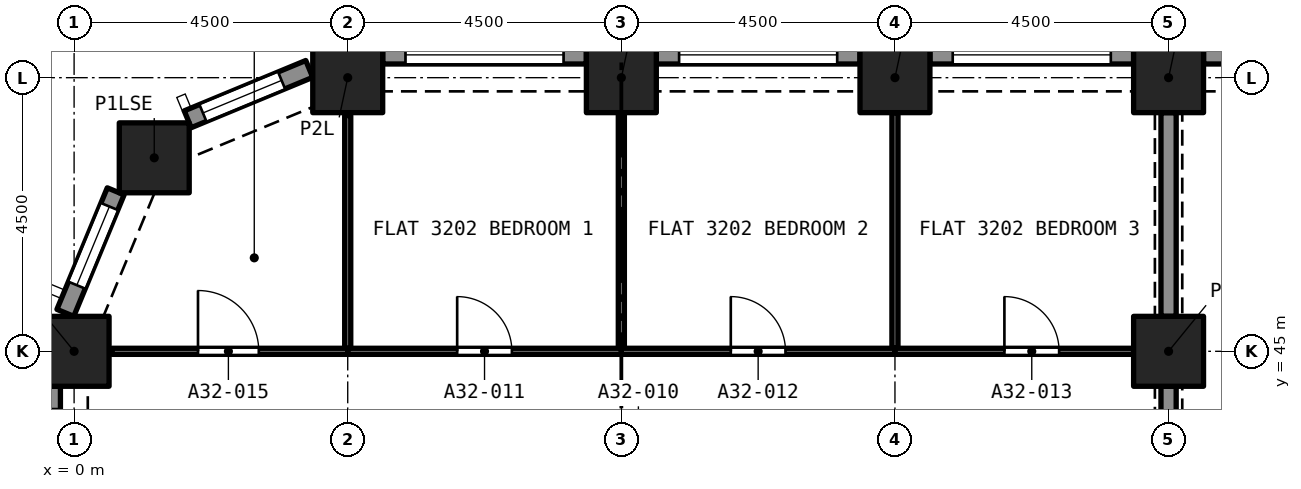
"""IFC4 building model, lengths in metres.
Left out: names, types, materials, properties, quantities, classifications, styles, units other than length and angle.
Written with IfcOpenShell. Run it as: python <this file> out.ifc"""

import sys

from ifc_helpers import new_model, si_unit, direction, frame, frame_2d, origin, origin_2d, place, context, subcontext, project, spatial, rectangle, extrude, element, fill, save


model = new_model("IFC4")
c1 = context("Model", 3, precision=1e-05, world=origin(), true_north=direction((0.0, 1.0)))
c2 = subcontext(c1, "Body", "Model", "MODEL_VIEW")
j1 = project(units=[si_unit("LENGTHUNIT", "METRE"), si_unit("PLANEANGLEUNIT", "RADIAN")], contexts=[c1])
p1 = place(None, origin())
s1 = spatial("IfcSite", under=j1, at=p1, CompositionType="ELEMENT")
p2 = place(p1, origin())
s2 = spatial("IfcBuilding", under=s1, at=p2, CompositionType="ELEMENT")
p3 = place(p2, frame((0.0, 0.0, 115.2)))
s3 = spatial("IfcBuildingStorey", under=s2, at=p3, CompositionType="ELEMENT", Elevation=115.2)
for number, where, z_axis, x_axis in (
    (1, (0.0, 45.0, 0.0), (0.0, 0.0, 1.0), (1.0, 0.0, 0.0)),
    (2, (18.0, 45.0, 0.0), (0.0, 0.0, 1.0), (1.0, 0.0, 0.0)),
    (3, (1.318, 48.182, 0.0), (0.0, 0.0, 1.0), (1.0, 0.0, 0.0)),
    (4, (4.5, 49.5, 0.0), (0.0, 0.0, 1.0), (1.0, 0.0, 0.0)),
    (5, (9.0, 49.5, 0.0), (0.0, 0.0, 1.0), (1.0, 0.0, 0.0)),
    (6, (13.5, 49.5, 0.0), (0.0, 0.0, 1.0), (1.0, 0.0, 0.0)),
    (7, (18.0, 49.5, 0.0), (0.0, 0.0, 1.0), (1.0, 0.0, 0.0)),
):
    element("IfcColumn", number, at=place(p3, frame(where, z_axis=z_axis, x_axis=x_axis)), inside=s3, PredefinedType="COLUMN", context=c2, shape_type="SweptSolid", body=[
        extrude(rectangle(XDim=1.15, YDim=1.15, at=origin_2d()), origin(), (0.0, 0.0, 1.0), 3.2),
    ])
p4 = place(p3, frame((18.575, 49.875, 0.0), z_axis=(0.0, 0.0, 1.0), x_axis=(1.0, 0.0, 0.0)))
e8 = element("IfcWall", 8, at=p4, inside=s3, PredefinedType="SOLIDWALL", context=c2, shape_type="SweptSolid", body=[
    extrude(rectangle(XDim=3.35, YDim=0.3, at=frame_2d((1.675, 0.0))), origin(), (0.0, 0.0, 1.0), 3.2),
])
p5 = place(p4, frame((0.375, 0.0, 0.45)))
e9 = element("IfcOpeningElement", 9, at=p5, cuts=e8, PredefinedType="OPENING", context=c2, shape_type="SweptSolid", body=[
    extrude(rectangle(XDim=2.6, YDim=1.95, at=frame_2d((1.3, 0.975))), frame((0.0, 0.16, 0.0), z_axis=(0.0, -1.0, 0.0), x_axis=(1.0, 0.0, 0.0)), (0.0, 0.0, 1.0), 0.32),
])
p6 = place(p3, frame((14.075, 49.875, 0.0), z_axis=(0.0, 0.0, 1.0), x_axis=(1.0, 0.0, 0.0)))
e10 = element("IfcWall", 10, at=p6, inside=s3, PredefinedType="SOLIDWALL", context=c2, shape_type="SweptSolid", body=[
    extrude(rectangle(XDim=3.35, YDim=0.3, at=frame_2d((1.675, 0.0))), origin(), (0.0, 0.0, 1.0), 3.2),
])
p7 = place(p6, frame((0.375, 0.0, 0.45)))
e11 = element("IfcOpeningElement", 11, at=p7, cuts=e10, PredefinedType="OPENING", context=c2, shape_type="SweptSolid", body=[
    extrude(rectangle(XDim=2.6, YDim=1.95, at=frame_2d((1.3, 0.975))), frame((0.0, 0.16, 0.0), z_axis=(0.0, -1.0, 0.0), x_axis=(1.0, 0.0, 0.0)), (0.0, 0.0, 1.0), 0.32),
])
p8 = place(p3, frame((9.575, 49.875, 0.0), z_axis=(0.0, 0.0, 1.0), x_axis=(1.0, 0.0, 0.0)))
e12 = element("IfcWall", 12, at=p8, inside=s3, PredefinedType="SOLIDWALL", context=c2, shape_type="SweptSolid", body=[
    extrude(rectangle(XDim=3.35, YDim=0.3, at=frame_2d((1.675, 0.0))), origin(), (0.0, 0.0, 1.0), 3.2),
])
p9 = place(p8, frame((0.375, 0.0, 0.45)))
e13 = element("IfcOpeningElement", 13, at=p9, cuts=e12, PredefinedType="OPENING", context=c2, shape_type="SweptSolid", body=[
    extrude(rectangle(XDim=2.6, YDim=1.95, at=frame_2d((1.3, 0.975))), frame((0.0, 0.16, 0.0), z_axis=(0.0, -1.0, 0.0), x_axis=(1.0, 0.0, 0.0)), (0.0, 0.0, 1.0), 0.32),
])
p10 = place(p3, frame((5.075, 49.875, 0.0), z_axis=(0.0, 0.0, 1.0), x_axis=(1.0, 0.0, 0.0)))
e14 = element("IfcWall", 14, at=p10, inside=s3, PredefinedType="SOLIDWALL", context=c2, shape_type="SweptSolid", body=[
    extrude(rectangle(XDim=3.35, YDim=0.3, at=frame_2d((1.675, 0.0))), origin(), (0.0, 0.0, 1.0), 3.2),
])
p11 = place(p10, frame((0.375, 0.0, 0.45)))
e15 = element("IfcOpeningElement", 15, at=p11, cuts=e14, PredefinedType="OPENING", context=c2, shape_type="SweptSolid", body=[
    extrude(rectangle(XDim=2.6, YDim=1.95, at=frame_2d((1.3, 0.975))), frame((0.0, 0.16, 0.0), z_axis=(0.0, -1.0, 0.0), x_axis=(1.0, 0.0, 0.0)), (0.0, 0.0, 1.0), 0.32),
])
p12 = place(p3, frame((1.869, 48.816, 0.0), z_axis=(0.0, 0.0, 1.0), x_axis=(0.923862802911, 0.382723818695, 0.0)))
e16 = element("IfcWall", 16, at=p12, inside=s3, PredefinedType="SOLIDWALL", context=c2, shape_type="SweptSolid", body=[
    extrude(rectangle(XDim=2.164, YDim=0.3, at=frame_2d((1.082, 0.0))), origin(), (0.0, 0.0, 1.0), 3.2),
])
p13 = place(p12, frame((0.271, 0.0, 0.45)))
e17 = element("IfcOpeningElement", 17, at=p13, cuts=e16, PredefinedType="OPENING", context=c2, shape_type="SweptSolid", body=[
    extrude(rectangle(XDim=1.4, YDim=1.95, at=frame_2d((0.7, 0.975))), frame((0.0, 0.16, 0.0), z_axis=(0.0, -1.0, 0.0), x_axis=(1.0, 0.0, 0.0)), (0.0, 0.0, 1.0), 0.32),
])
p14 = place(p3, frame((-0.144, 45.632, 0.0), z_axis=(0.0, 0.0, 1.0), x_axis=(0.382723818695, 0.923862802911, 0.0)))
e18 = element("IfcWall", 18, at=p14, inside=s3, PredefinedType="SOLIDWALL", context=c2, shape_type="SweptSolid", body=[
    extrude(rectangle(XDim=2.164, YDim=0.3, at=frame_2d((1.082, 0.0))), origin(), (0.0, 0.0, 1.0), 3.2),
])
p15 = place(p14, frame((0.493, 0.0, 0.45)))
e19 = element("IfcOpeningElement", 19, at=p15, cuts=e18, PredefinedType="OPENING", context=c2, shape_type="SweptSolid", body=[
    extrude(rectangle(XDim=1.4, YDim=1.95, at=frame_2d((0.7, 0.975))), frame((0.0, 0.16, 0.0), z_axis=(0.0, -1.0, 0.0), x_axis=(1.0, 0.0, 0.0)), (0.0, 0.0, 1.0), 0.32),
])
p16 = place(p3, frame((-0.375, 41.075, 0.0), z_axis=(0.0, 0.0, 1.0), x_axis=(0.0, 1.0, 0.0)))
e20 = element("IfcWall", 20, at=p16, inside=s3, PredefinedType="SOLIDWALL", context=c2, shape_type="SweptSolid", body=[
    extrude(rectangle(XDim=3.35, YDim=0.3, at=frame_2d((1.675, 0.0))), origin(), (0.0, 0.0, 1.0), 3.2),
])
p17 = place(p16, frame((0.375, 0.0, 0.45)))
e21 = element("IfcOpeningElement", 21, at=p17, cuts=e20, PredefinedType="OPENING", context=c2, shape_type="SweptSolid", body=[
    extrude(rectangle(XDim=2.6, YDim=1.95, at=frame_2d((1.3, 0.975))), frame((0.0, 0.16, 0.0), z_axis=(0.0, -1.0, 0.0), x_axis=(1.0, 0.0, 0.0)), (0.0, 0.0, 1.0), 0.32),
])
p18 = place(p3, frame((9.0, 45.05, 0.0), z_axis=(0.0, 0.0, 1.0), x_axis=(0.0, 1.0, 0.0)))
e22 = element("IfcWall", 22, at=p18, inside=s3, PredefinedType="PARTITIONING", context=c2, shape_type="SweptSolid", body=[
    extrude(rectangle(XDim=3.875, YDim=0.1, at=frame_2d((1.938, 0.0))), origin(), (0.0, 0.0, 1.0), 2.9),
])
p19 = place(p3, frame((4.5, 45.0, 0.0), z_axis=(0.0, 0.0, 1.0), x_axis=(1.0, 0.0, 0.0)))
e23 = element("IfcWall", 23, at=p19, inside=s3, PredefinedType="PARTITIONING", context=c2, shape_type="SweptSolid", body=[
    extrude(rectangle(XDim=4.5, YDim=0.1, at=frame_2d((2.25, 0.0))), origin(), (0.0, 0.0, 1.0), 2.9),
])
p20 = place(p19, frame((1.8, 0.0, 0.0)))
e24 = element("IfcOpeningElement", 24, at=p20, cuts=e23, PredefinedType="OPENING", context=c2, shape_type="SweptSolid", body=[
    extrude(rectangle(XDim=0.9, YDim=2.1, at=frame_2d((0.45, 1.05))), frame((0.0, 0.06, 0.0), z_axis=(0.0, -1.0, 0.0), x_axis=(1.0, 0.0, 0.0)), (0.0, 0.0, 1.0), 0.12),
])
p21 = place(p3, frame((4.5, 45.05, 0.0), z_axis=(0.0, 0.0, 1.0), x_axis=(0.0, 1.0, 0.0)))
e25 = element("IfcWall", 25, at=p21, inside=s3, PredefinedType="PARTITIONING", context=c2, shape_type="SweptSolid", body=[
    extrude(rectangle(XDim=3.828, YDim=0.1, at=frame_2d((1.914, 0.0))), origin(), (0.0, 0.0, 1.0), 2.9),
])
p22 = place(p3, frame((13.5, 45.05, 0.0), z_axis=(0.0, 0.0, 1.0), x_axis=(0.0, 1.0, 0.0)))
e26 = element("IfcWall", 26, at=p22, inside=s3, PredefinedType="PARTITIONING", context=c2, shape_type="SweptSolid", body=[
    extrude(rectangle(XDim=3.875, YDim=0.1, at=frame_2d((1.938, 0.0))), origin(), (0.0, 0.0, 1.0), 2.9),
])
p23 = place(p3, frame((9.0, 45.0, 0.0), z_axis=(0.0, 0.0, 1.0), x_axis=(1.0, 0.0, 0.0)))
e27 = element("IfcWall", 27, at=p23, inside=s3, PredefinedType="PARTITIONING", context=c2, shape_type="SweptSolid", body=[
    extrude(rectangle(XDim=4.5, YDim=0.1, at=frame_2d((2.25, 0.0))), origin(), (0.0, 0.0, 1.0), 2.9),
])
p24 = place(p23, frame((1.8, 0.0, 0.0)))
e28 = element("IfcOpeningElement", 28, at=p24, cuts=e27, PredefinedType="OPENING", context=c2, shape_type="SweptSolid", body=[
    extrude(rectangle(XDim=0.9, YDim=2.1, at=frame_2d((0.45, 1.05))), frame((0.0, 0.06, 0.0), z_axis=(0.0, -1.0, 0.0), x_axis=(1.0, 0.0, 0.0)), (0.0, 0.0, 1.0), 0.12),
])
p25 = place(p3, frame((13.5, 45.0, 0.0), z_axis=(0.0, 0.0, 1.0), x_axis=(1.0, 0.0, 0.0)))
e29 = element("IfcWall", 29, at=p25, inside=s3, PredefinedType="PARTITIONING", context=c2, shape_type="SweptSolid", body=[
    extrude(rectangle(XDim=3.925, YDim=0.1, at=frame_2d((1.962, 0.0))), origin(), (0.0, 0.0, 1.0), 2.9),
])
p26 = place(p25, frame((1.8, 0.0, 0.0)))
e30 = element("IfcOpeningElement", 30, at=p26, cuts=e29, PredefinedType="OPENING", context=c2, shape_type="SweptSolid", body=[
    extrude(rectangle(XDim=0.9, YDim=2.1, at=frame_2d((0.45, 1.05))), frame((0.0, 0.06, 0.0), z_axis=(0.0, -1.0, 0.0), x_axis=(1.0, 0.0, 0.0)), (0.0, 0.0, 1.0), 0.12),
])
p27 = place(p3, frame((18.0, 45.575, 0.0), z_axis=(0.0, 0.0, 1.0), x_axis=(0.0, 1.0, 0.0)))
e31 = element("IfcWall", 31, at=p27, inside=s3, PredefinedType="PARTITIONING", context=c2, shape_type="SweptSolid", body=[
    extrude(rectangle(XDim=3.35, YDim=0.25, at=frame_2d((1.675, 0.0))), origin(), (0.0, 0.0, 1.0), 2.38),
])
p28 = place(p3, frame((0.622, 45.0, 0.0), z_axis=(0.0, 0.0, 1.0), x_axis=(1.0, 0.0, 0.0)))
e32 = element("IfcWall", 32, at=p28, inside=s3, PredefinedType="PARTITIONING", context=c2, shape_type="SweptSolid", body=[
    extrude(rectangle(XDim=3.878, YDim=0.1, at=frame_2d((1.939, 0.0))), origin(), (0.0, 0.0, 1.0), 2.9),
])
p29 = place(p28, frame((1.415, 0.0, 0.0)))
e33 = element("IfcOpeningElement", 33, at=p29, cuts=e32, PredefinedType="OPENING", context=c2, shape_type="SweptSolid", body=[
    extrude(rectangle(XDim=1.0, YDim=2.1, at=frame_2d((0.5, 1.05))), frame((0.0, 0.06, 0.0), z_axis=(0.0, -1.0, 0.0), x_axis=(1.0, 0.0, 0.0)), (0.0, 0.0, 1.0), 0.12),
])
p30 = place(p3, frame((18.0, 41.075, 0.0), z_axis=(0.0, 0.0, 1.0), x_axis=(0.0, 1.0, 0.0)))
e34 = element("IfcWall", 34, at=p30, inside=s3, PredefinedType="PARTITIONING", context=c2, shape_type="SweptSolid", body=[
    extrude(rectangle(XDim=3.35, YDim=0.25, at=frame_2d((1.675, 0.0))), origin(), (0.0, 0.0, 1.0), 2.38),
])
p31 = place(p7, origin())
e35 = element("IfcWindow", 35, at=p31, inside=s3, PartitioningType="SINGLE_PANEL", PredefinedType="WINDOW", context=c2, shape_type="SweptSolid", body=[
    extrude(rectangle(XDim=2.6, YDim=1.95, at=frame_2d((1.3, 0.975))), frame((0.0, 0.03, 0.0), z_axis=(0.0, -1.0, 0.0), x_axis=(1.0, 0.0, 0.0)), (0.0, 0.0, 1.0), 0.06),
])
fill(e11, e35)
p32 = place(p9, origin())
e36 = element("IfcWindow", 36, at=p32, inside=s3, PartitioningType="SINGLE_PANEL", PredefinedType="WINDOW", context=c2, shape_type="SweptSolid", body=[
    extrude(rectangle(XDim=2.6, YDim=1.95, at=frame_2d((1.3, 0.975))), frame((0.0, 0.03, 0.0), z_axis=(0.0, -1.0, 0.0), x_axis=(1.0, 0.0, 0.0)), (0.0, 0.0, 1.0), 0.06),
])
fill(e13, e36)
p33 = place(p11, origin())
e37 = element("IfcWindow", 37, at=p33, inside=s3, PartitioningType="SINGLE_PANEL", PredefinedType="WINDOW", context=c2, shape_type="SweptSolid", body=[
    extrude(rectangle(XDim=2.6, YDim=1.95, at=frame_2d((1.3, 0.975))), frame((0.0, 0.03, 0.0), z_axis=(0.0, -1.0, 0.0), x_axis=(1.0, 0.0, 0.0)), (0.0, 0.0, 1.0), 0.06),
])
fill(e15, e37)
p34 = place(p13, origin())
e38 = element("IfcWindow", 38, at=p34, inside=s3, PartitioningType="SINGLE_PANEL", PredefinedType="WINDOW", context=c2, shape_type="SweptSolid", body=[
    extrude(rectangle(XDim=1.4, YDim=1.95, at=frame_2d((0.7, 0.975))), frame((0.0, 0.03, 0.0), z_axis=(0.0, -1.0, 0.0), x_axis=(1.0, 0.0, 0.0)), (0.0, 0.0, 1.0), 0.06),
])
fill(e17, e38)
p35 = place(p15, origin())
e39 = element("IfcWindow", 39, at=p35, inside=s3, PartitioningType="SINGLE_PANEL", PredefinedType="WINDOW", context=c2, shape_type="SweptSolid", body=[
    extrude(rectangle(XDim=1.4, YDim=1.95, at=frame_2d((0.7, 0.975))), frame((0.0, 0.03, 0.0), z_axis=(0.0, -1.0, 0.0), x_axis=(1.0, 0.0, 0.0)), (0.0, 0.0, 1.0), 0.06),
])
fill(e19, e39)
p36 = place(p20, origin())
e40 = element("IfcDoor", 40, at=p36, inside=s3, OperationType="SINGLE_SWING_RIGHT", PredefinedType="DOOR", context=c2, shape_type="SweptSolid", body=[
    extrude(rectangle(XDim=0.9, YDim=2.1, at=frame_2d((0.45, 1.05))), frame((0.0, 0.025, 0.0), z_axis=(0.0, -1.0, 0.0), x_axis=(1.0, 0.0, 0.0)), (0.0, 0.0, 1.0), 0.05),
])
fill(e24, e40)
p37 = place(p24, origin())
e41 = element("IfcDoor", 41, at=p37, inside=s3, OperationType="SINGLE_SWING_LEFT", PredefinedType="DOOR", context=c2, shape_type="SweptSolid", body=[
    extrude(rectangle(XDim=0.9, YDim=2.1, at=frame_2d((0.45, 1.05))), frame((0.0, 0.025, 0.0), z_axis=(0.0, -1.0, 0.0), x_axis=(1.0, 0.0, 0.0)), (0.0, 0.0, 1.0), 0.05),
])
fill(e28, e41)
p38 = place(p26, origin())
e42 = element("IfcDoor", 42, at=p38, inside=s3, OperationType="SINGLE_SWING_RIGHT", PredefinedType="DOOR", context=c2, shape_type="SweptSolid", body=[
    extrude(rectangle(XDim=0.9, YDim=2.1, at=frame_2d((0.45, 1.05))), frame((0.0, 0.025, 0.0), z_axis=(0.0, -1.0, 0.0), x_axis=(1.0, 0.0, 0.0)), (0.0, 0.0, 1.0), 0.05),
])
fill(e30, e42)
p39 = place(p29, origin())
e43 = element("IfcDoor", 43, at=p39, inside=s3, OperationType="SINGLE_SWING_LEFT", PredefinedType="DOOR", context=c2, shape_type="SweptSolid", body=[
    extrude(rectangle(XDim=1.0, YDim=2.1, at=frame_2d((0.5, 1.05))), frame((0.0, 0.025, 0.0), z_axis=(0.0, -1.0, 0.0), x_axis=(1.0, 0.0, 0.0)), (0.0, 0.0, 1.0), 0.05),
])
fill(e33, e43)
save(model, sys.argv[1])
